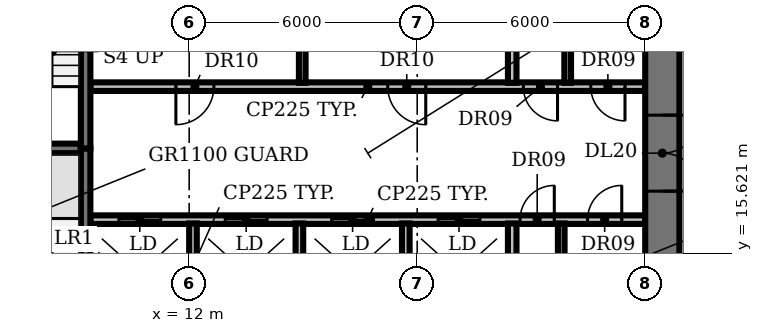
"""IFC4 building model, lengths in metres.
Left out: names, types, materials, properties, quantities, classifications, styles, units other than length and angle.
Written with IfcOpenShell. Run it as: python <this file> out.ifc"""

import sys

from ifc_helpers import new_model, si_unit, direction, frame, frame_2d, origin, place, context, subcontext, project, spatial, rectangle, extrude, element, fill, save


model = new_model("IFC4")
c1 = context("Model", 3, precision=1e-05, world=origin(), true_north=direction((0.0, 1.0)))
c2 = subcontext(c1, "Body", "Model", "MODEL_VIEW")
j1 = project(units=[si_unit("LENGTHUNIT", "METRE"), si_unit("PLANEANGLEUNIT", "RADIAN")], contexts=[c1])
p1 = place(None, origin())
s1 = spatial("IfcSite", under=j1, at=p1, CompositionType="ELEMENT")
p2 = place(p1, origin())
s2 = spatial("IfcBuilding", under=s1, at=p2, CompositionType="ELEMENT")
p3 = place(p2, frame((0.0, 0.0, 75.2)))
s3 = spatial("IfcBuildingStorey", under=s2, at=p3, CompositionType="ELEMENT", Elevation=75.2)
p4 = place(p3, frame((9.4, 16.5, 0.0), z_axis=(0.0, 0.0, 1.0), x_axis=(1.0, 0.0, 0.0)))
e1 = element("IfcWall", 1, at=p4, inside=s3, PredefinedType="PARTITIONING", context=c2, shape_type="SweptSolid", body=[
    extrude(rectangle(XDim=14.6, YDim=0.225, at=frame_2d((7.3, 0.0))), origin(), (0.0, 0.0, 1.0), 3.8),
])
p5 = place(p4, frame((0.75, 0.0, 0.0)))
e2 = element("IfcOpeningElement", 2, at=p5, cuts=e1, PredefinedType="OPENING", context=c2, shape_type="SweptSolid", body=[
    extrude(rectangle(XDim=1.1, YDim=2.1, at=frame_2d((0.55, 1.05))), frame((0.0, 0.123, 0.0), z_axis=(0.0, -1.0, 0.0), x_axis=(1.0, 0.0, 0.0)), (0.0, 0.0, 1.0), 0.245),
])
p6 = place(p4, frame((3.55, 0.0, 0.0)))
e3 = element("IfcOpeningElement", 3, at=p6, cuts=e1, PredefinedType="OPENING", context=c2, shape_type="SweptSolid", body=[
    extrude(rectangle(XDim=1.1, YDim=2.1, at=frame_2d((0.55, 1.05))), frame((0.0, 0.123, 0.0), z_axis=(0.0, -1.0, 0.0), x_axis=(1.0, 0.0, 0.0)), (0.0, 0.0, 1.0), 0.245),
])
p7 = place(p4, frame((6.35, 0.0, 0.0)))
e4 = element("IfcOpeningElement", 4, at=p7, cuts=e1, PredefinedType="OPENING", context=c2, shape_type="SweptSolid", body=[
    extrude(rectangle(XDim=1.1, YDim=2.1, at=frame_2d((0.55, 1.05))), frame((0.0, 0.123, 0.0), z_axis=(0.0, -1.0, 0.0), x_axis=(1.0, 0.0, 0.0)), (0.0, 0.0, 1.0), 0.245),
])
p8 = place(p4, frame((9.15, 0.0, 0.0)))
e5 = element("IfcOpeningElement", 5, at=p8, cuts=e1, PredefinedType="OPENING", context=c2, shape_type="SweptSolid", body=[
    extrude(rectangle(XDim=1.1, YDim=2.1, at=frame_2d((0.55, 1.05))), frame((0.0, 0.123, 0.0), z_axis=(0.0, -1.0, 0.0), x_axis=(1.0, 0.0, 0.0)), (0.0, 0.0, 1.0), 0.245),
])
p9 = place(p4, frame((11.308, 0.0, 0.0)))
e6 = element("IfcOpeningElement", 6, at=p9, cuts=e1, PredefinedType="OPENING", context=c2, shape_type="SweptSolid", body=[
    extrude(rectangle(XDim=0.9, YDim=2.1, at=frame_2d((0.45, 1.05))), frame((0.0, 0.123, 0.0), z_axis=(0.0, -1.0, 0.0), x_axis=(1.0, 0.0, 0.0)), (0.0, 0.0, 1.0), 0.245),
])
p10 = place(p4, frame((13.083, 0.0, 0.0)))
e7 = element("IfcOpeningElement", 7, at=p10, cuts=e1, PredefinedType="OPENING", context=c2, shape_type="SweptSolid", body=[
    extrude(rectangle(XDim=0.9, YDim=2.1, at=frame_2d((0.45, 1.05))), frame((0.0, 0.123, 0.0), z_axis=(0.0, -1.0, 0.0), x_axis=(1.0, 0.0, 0.0)), (0.0, 0.0, 1.0), 0.245),
])
p11 = place(p3, frame((6.0, 18.375, 0.0), z_axis=(0.0, 0.0, 1.0), x_axis=(1.0, 0.0, 0.0)))
e8 = element("IfcWall", 8, at=p11, inside=s3, PredefinedType="SHEAR", context=c2, shape_type="SweptSolid", body=[
    extrude(rectangle(XDim=3.15, YDim=0.25, at=frame_2d((1.575, 0.0))), origin(), (0.0, 0.0, 1.0), 3.8),
])
p12 = place(p3, frame((24.0, 20.0, 0.0), z_axis=(0.0, 0.0, 1.0), x_axis=(-1.0, 0.0, 0.0)))
e9 = element("IfcWall", 9, at=p12, inside=s3, PredefinedType="PARTITIONING", context=c2, shape_type="SweptSolid", body=[
    extrude(rectangle(XDim=14.6, YDim=0.225, at=frame_2d((7.3, 0.0))), origin(), (0.0, 0.0, 1.0), 3.8),
])
p13 = place(p12, frame((11.35, 0.0, 0.0)))
e10 = element("IfcOpeningElement", 10, at=p13, cuts=e9, PredefinedType="OPENING", context=c2, shape_type="SweptSolid", body=[
    extrude(rectangle(XDim=1.0, YDim=2.1, at=frame_2d((0.5, 1.05))), frame((0.0, 0.123, 0.0), z_axis=(0.0, -1.0, 0.0), x_axis=(1.0, 0.0, 0.0)), (0.0, 0.0, 1.0), 0.245),
])
p14 = place(p12, frame((5.775, 0.0, 0.0)))
e11 = element("IfcOpeningElement", 11, at=p14, cuts=e9, PredefinedType="OPENING", context=c2, shape_type="SweptSolid", body=[
    extrude(rectangle(XDim=1.0, YDim=2.1, at=frame_2d((0.5, 1.05))), frame((0.0, 0.123, 0.0), z_axis=(0.0, -1.0, 0.0), x_axis=(1.0, 0.0, 0.0)), (0.0, 0.0, 1.0), 0.245),
])
p15 = place(p12, frame((2.308, 0.0, 0.0)))
e12 = element("IfcOpeningElement", 12, at=p15, cuts=e9, PredefinedType="OPENING", context=c2, shape_type="SweptSolid", body=[
    extrude(rectangle(XDim=0.9, YDim=2.1, at=frame_2d((0.45, 1.05))), frame((0.0, 0.123, 0.0), z_axis=(0.0, -1.0, 0.0), x_axis=(1.0, 0.0, 0.0)), (0.0, 0.0, 1.0), 0.245),
])
p16 = place(p12, frame((0.532, 0.0, 0.0)))
e13 = element("IfcOpeningElement", 13, at=p16, cuts=e9, PredefinedType="OPENING", context=c2, shape_type="SweptSolid", body=[
    extrude(rectangle(XDim=0.9, YDim=2.1, at=frame_2d((0.45, 1.05))), frame((0.0, 0.123, 0.0), z_axis=(0.0, -1.0, 0.0), x_axis=(1.0, 0.0, 0.0)), (0.0, 0.0, 1.0), 0.245),
])
p17 = place(p3, frame((9.275, 18.375, 0.0), z_axis=(0.0, 0.0, 1.0), x_axis=(0.0, -1.0, 0.0)))
e14 = element("IfcWall", 14, at=p17, inside=s3, PredefinedType="SHEAR", context=c2, shape_type="SweptSolid", body=[
    extrude(rectangle(XDim=6.55, YDim=0.25, at=frame_2d((3.275, 0.0))), origin(), (0.0, 0.0, 1.0), 3.8),
])
p18 = place(p17, frame((5.075, 0.0, 0.0)))
e15 = element("IfcOpeningElement", 15, at=p18, cuts=e14, PredefinedType="OPENING", context=c2, shape_type="SweptSolid", body=[
    extrude(rectangle(XDim=1.0, YDim=2.1, at=frame_2d((0.5, 1.05))), frame((0.0, 0.135, 0.0), z_axis=(0.0, -1.0, 0.0), x_axis=(1.0, 0.0, 0.0)), (0.0, 0.0, 1.0), 0.27),
])
p19 = place(p3, frame((9.275, 18.375, 0.0), z_axis=(0.0, 0.0, 1.0), x_axis=(0.0, 1.0, 0.0)))
e16 = element("IfcWall", 16, at=p19, inside=s3, PredefinedType="SHEAR", context=c2, shape_type="SweptSolid", body=[
    extrude(rectangle(XDim=6.425, YDim=0.25, at=frame_2d((3.212, 0.0))), origin(), (0.0, 0.0, 1.0), 3.8),
])
for number, where, z_axis, x_axis in (
    (17, (12.1, 13.8, 0.0), (0.0, 0.0, 1.0), (0.0, 1.0, 0.0)),
    (18, (14.9, 13.8, 0.0), (0.0, 0.0, 1.0), (0.0, 1.0, 0.0)),
):
    element("IfcWall", number, at=place(p3, frame(where, z_axis=z_axis, x_axis=x_axis)), inside=s3, PredefinedType="SOLIDWALL", context=c2, shape_type="SweptSolid", body=[
        extrude(rectangle(XDim=2.6, YDim=0.2, at=frame_2d((1.3, 0.0))), origin(), (0.0, 0.0, 1.0), 3.8),
    ])
p20 = place(p3, frame((14.975, 20.1, 0.0), z_axis=(0.0, 0.0, 1.0), x_axis=(0.0, 1.0, 0.0)))
e19 = element("IfcWall", 19, at=p20, inside=s3, PredefinedType="PARTITIONING", context=c2, shape_type="SweptSolid", body=[
    extrude(rectangle(XDim=2.6, YDim=0.175, at=frame_2d((1.3, 0.0))), origin(), (0.0, 0.0, 1.0), 3.8),
])
p21 = place(p3, frame((17.7, 13.8, 0.0), z_axis=(0.0, 0.0, 1.0), x_axis=(0.0, 1.0, 0.0)))
e20 = element("IfcWall", 20, at=p21, inside=s3, PredefinedType="SOLIDWALL", context=c2, shape_type="SweptSolid", body=[
    extrude(rectangle(XDim=2.6, YDim=0.2, at=frame_2d((1.3, 0.0))), origin(), (0.0, 0.0, 1.0), 3.8),
])
for number, where, z_axis, x_axis in (
    (21, (20.5, 13.8, 0.0), (0.0, 0.0, 1.0), (0.0, 1.0, 0.0)),
    (22, (20.5, 20.1, 0.0), (0.0, 0.0, 1.0), (0.0, 1.0, 0.0)),
):
    element("IfcWall", number, at=place(p3, frame(where, z_axis=z_axis, x_axis=x_axis)), inside=s3, PredefinedType="PARTITIONING", context=c2, shape_type="SweptSolid", body=[
        extrude(rectangle(XDim=2.6, YDim=0.225, at=frame_2d((1.3, 0.0))), origin(), (0.0, 0.0, 1.0), 3.8),
    ])
for number, where, z_axis, x_axis in (
    (23, (21.79, 13.8, 0.0), (0.0, 0.0, 1.0), (0.0, 1.0, 0.0)),
    (24, (21.96, 20.1, 0.0), (0.0, 0.0, 1.0), (0.0, 1.0, 0.0)),
):
    element("IfcWall", number, at=place(p3, frame(where, z_axis=z_axis, x_axis=x_axis)), inside=s3, PredefinedType="PARTITIONING", context=c2, shape_type="SweptSolid", body=[
        extrude(rectangle(XDim=2.6, YDim=0.175, at=frame_2d((1.3, 0.0))), origin(), (0.0, 0.0, 1.0), 3.8),
    ])
p22 = place(p3, frame((24.45, 25.7, 0.0), z_axis=(0.0, 0.0, 1.0), x_axis=(0.0, -1.0, 0.0)))
e25 = element("IfcWall", 25, at=p22, inside=s3, PredefinedType="SHEAR", context=c2, shape_type="SweptSolid", body=[
    extrude(rectangle(XDim=21.2, YDim=0.9, at=frame_2d((10.6, 0.0))), origin(), (0.0, 0.0, 1.0), 3.8),
])
p23 = place(p22, frame((18.55, 0.0, 0.0)))
e26 = element("IfcOpeningElement", 26, at=p23, cuts=e25, PredefinedType="OPENING", context=c2, shape_type="SweptSolid", body=[
    extrude(rectangle(XDim=1.5, YDim=2.1, at=frame_2d((0.75, 1.05))), frame((0.0, 0.46, 0.0), z_axis=(0.0, -1.0, 0.0), x_axis=(1.0, 0.0, 0.0)), (0.0, 0.0, 1.0), 0.92),
])
p24 = place(p22, frame((12.45, 0.0, 0.0)))
e27 = element("IfcOpeningElement", 27, at=p24, cuts=e25, PredefinedType="OPENING", context=c2, shape_type="SweptSolid", body=[
    extrude(rectangle(XDim=0.9, YDim=2.1, at=frame_2d((0.45, 1.05))), frame((0.0, 0.46, 0.0), z_axis=(0.0, -1.0, 0.0), x_axis=(1.0, 0.0, 0.0)), (0.0, 0.0, 1.0), 0.92),
])
p25 = place(p22, frame((6.45, 0.0, 0.0)))
e28 = element("IfcOpeningElement", 28, at=p25, cuts=e25, PredefinedType="OPENING", context=c2, shape_type="SweptSolid", body=[
    extrude(rectangle(XDim=2.0, YDim=2.1, at=frame_2d((1.0, 1.05))), frame((0.0, 0.46, 0.0), z_axis=(0.0, -1.0, 0.0), x_axis=(1.0, 0.0, 0.0)), (0.0, 0.0, 1.0), 0.92),
])
p26 = place(p5, origin())
e29 = element("IfcDoor", 29, at=p26, inside=s3, OperationType="DOUBLE_DOOR_SLIDING", PredefinedType="DOOR", context=c2, shape_type="SweptSolid", body=[
    extrude(rectangle(XDim=1.1, YDim=2.1, at=frame_2d((0.55, 1.05))), frame((0.0, 0.025, 0.0), z_axis=(0.0, -1.0, 0.0), x_axis=(1.0, 0.0, 0.0)), (0.0, 0.0, 1.0), 0.05),
])
fill(e2, e29)
p27 = place(p6, origin())
e30 = element("IfcDoor", 30, at=p27, inside=s3, OperationType="DOUBLE_DOOR_SLIDING", PredefinedType="DOOR", context=c2, shape_type="SweptSolid", body=[
    extrude(rectangle(XDim=1.1, YDim=2.1, at=frame_2d((0.55, 1.05))), frame((0.0, 0.025, 0.0), z_axis=(0.0, -1.0, 0.0), x_axis=(1.0, 0.0, 0.0)), (0.0, 0.0, 1.0), 0.05),
])
fill(e3, e30)
p28 = place(p7, origin())
e31 = element("IfcDoor", 31, at=p28, inside=s3, OperationType="DOUBLE_DOOR_SLIDING", PredefinedType="DOOR", context=c2, shape_type="SweptSolid", body=[
    extrude(rectangle(XDim=1.1, YDim=2.1, at=frame_2d((0.55, 1.05))), frame((0.0, 0.025, 0.0), z_axis=(0.0, -1.0, 0.0), x_axis=(1.0, 0.0, 0.0)), (0.0, 0.0, 1.0), 0.05),
])
fill(e4, e31)
p29 = place(p8, origin())
e32 = element("IfcDoor", 32, at=p29, inside=s3, OperationType="DOUBLE_DOOR_SLIDING", PredefinedType="DOOR", context=c2, shape_type="SweptSolid", body=[
    extrude(rectangle(XDim=1.1, YDim=2.1, at=frame_2d((0.55, 1.05))), frame((0.0, 0.025, 0.0), z_axis=(0.0, -1.0, 0.0), x_axis=(1.0, 0.0, 0.0)), (0.0, 0.0, 1.0), 0.05),
])
fill(e5, e32)
p30 = place(p9, origin())
e33 = element("IfcDoor", 33, at=p30, inside=s3, OperationType="SINGLE_SWING_RIGHT", PredefinedType="DOOR", context=c2, shape_type="SweptSolid", body=[
    extrude(rectangle(XDim=0.9, YDim=2.1, at=frame_2d((0.45, 1.05))), frame((0.0, 0.025, 0.0), z_axis=(0.0, -1.0, 0.0), x_axis=(1.0, 0.0, 0.0)), (0.0, 0.0, 1.0), 0.05),
])
fill(e6, e33)
p31 = place(p10, origin())
e34 = element("IfcDoor", 34, at=p31, inside=s3, OperationType="SINGLE_SWING_RIGHT", PredefinedType="DOOR", context=c2, shape_type="SweptSolid", body=[
    extrude(rectangle(XDim=0.9, YDim=2.1, at=frame_2d((0.45, 1.05))), frame((0.0, 0.025, 0.0), z_axis=(0.0, -1.0, 0.0), x_axis=(1.0, 0.0, 0.0)), (0.0, 0.0, 1.0), 0.05),
])
fill(e7, e34)
p32 = place(p13, origin())
e35 = element("IfcDoor", 35, at=p32, inside=s3, OperationType="SINGLE_SWING_RIGHT", PredefinedType="DOOR", context=c2, shape_type="SweptSolid", body=[
    extrude(rectangle(XDim=1.0, YDim=2.1, at=frame_2d((0.5, 1.05))), frame((0.0, 0.025, 0.0), z_axis=(0.0, -1.0, 0.0), x_axis=(1.0, 0.0, 0.0)), (0.0, 0.0, 1.0), 0.05),
])
fill(e10, e35)
p33 = place(p14, origin())
e36 = element("IfcDoor", 36, at=p33, inside=s3, OperationType="SINGLE_SWING_LEFT", PredefinedType="DOOR", context=c2, shape_type="SweptSolid", body=[
    extrude(rectangle(XDim=1.0, YDim=2.1, at=frame_2d((0.5, 1.05))), frame((0.0, 0.025, 0.0), z_axis=(0.0, -1.0, 0.0), x_axis=(1.0, 0.0, 0.0)), (0.0, 0.0, 1.0), 0.05),
])
fill(e11, e36)
p34 = place(p15, origin())
e37 = element("IfcDoor", 37, at=p34, inside=s3, OperationType="SINGLE_SWING_LEFT", PredefinedType="DOOR", context=c2, shape_type="SweptSolid", body=[
    extrude(rectangle(XDim=0.9, YDim=2.1, at=frame_2d((0.45, 1.05))), frame((0.0, 0.025, 0.0), z_axis=(0.0, -1.0, 0.0), x_axis=(1.0, 0.0, 0.0)), (0.0, 0.0, 1.0), 0.05),
])
fill(e12, e37)
p35 = place(p16, origin())
e38 = element("IfcDoor", 38, at=p35, inside=s3, OperationType="SINGLE_SWING_LEFT", PredefinedType="DOOR", context=c2, shape_type="SweptSolid", body=[
    extrude(rectangle(XDim=0.9, YDim=2.1, at=frame_2d((0.45, 1.05))), frame((0.0, 0.025, 0.0), z_axis=(0.0, -1.0, 0.0), x_axis=(1.0, 0.0, 0.0)), (0.0, 0.0, 1.0), 0.05),
])
fill(e13, e38)
p36 = place(p25, origin())
e39 = element("IfcDoor", 39, at=p36, inside=s3, OperationType="DOUBLE_DOOR_SINGLE_SWING", PredefinedType="DOOR", context=c2, shape_type="SweptSolid", body=[
    extrude(rectangle(XDim=2.0, YDim=2.1, at=frame_2d((1.0, 1.05))), frame((0.0, 0.025, 0.0), z_axis=(0.0, -1.0, 0.0), x_axis=(1.0, 0.0, 0.0)), (0.0, 0.0, 1.0), 0.05),
])
fill(e28, e39)
save(model, sys.argv[1])
